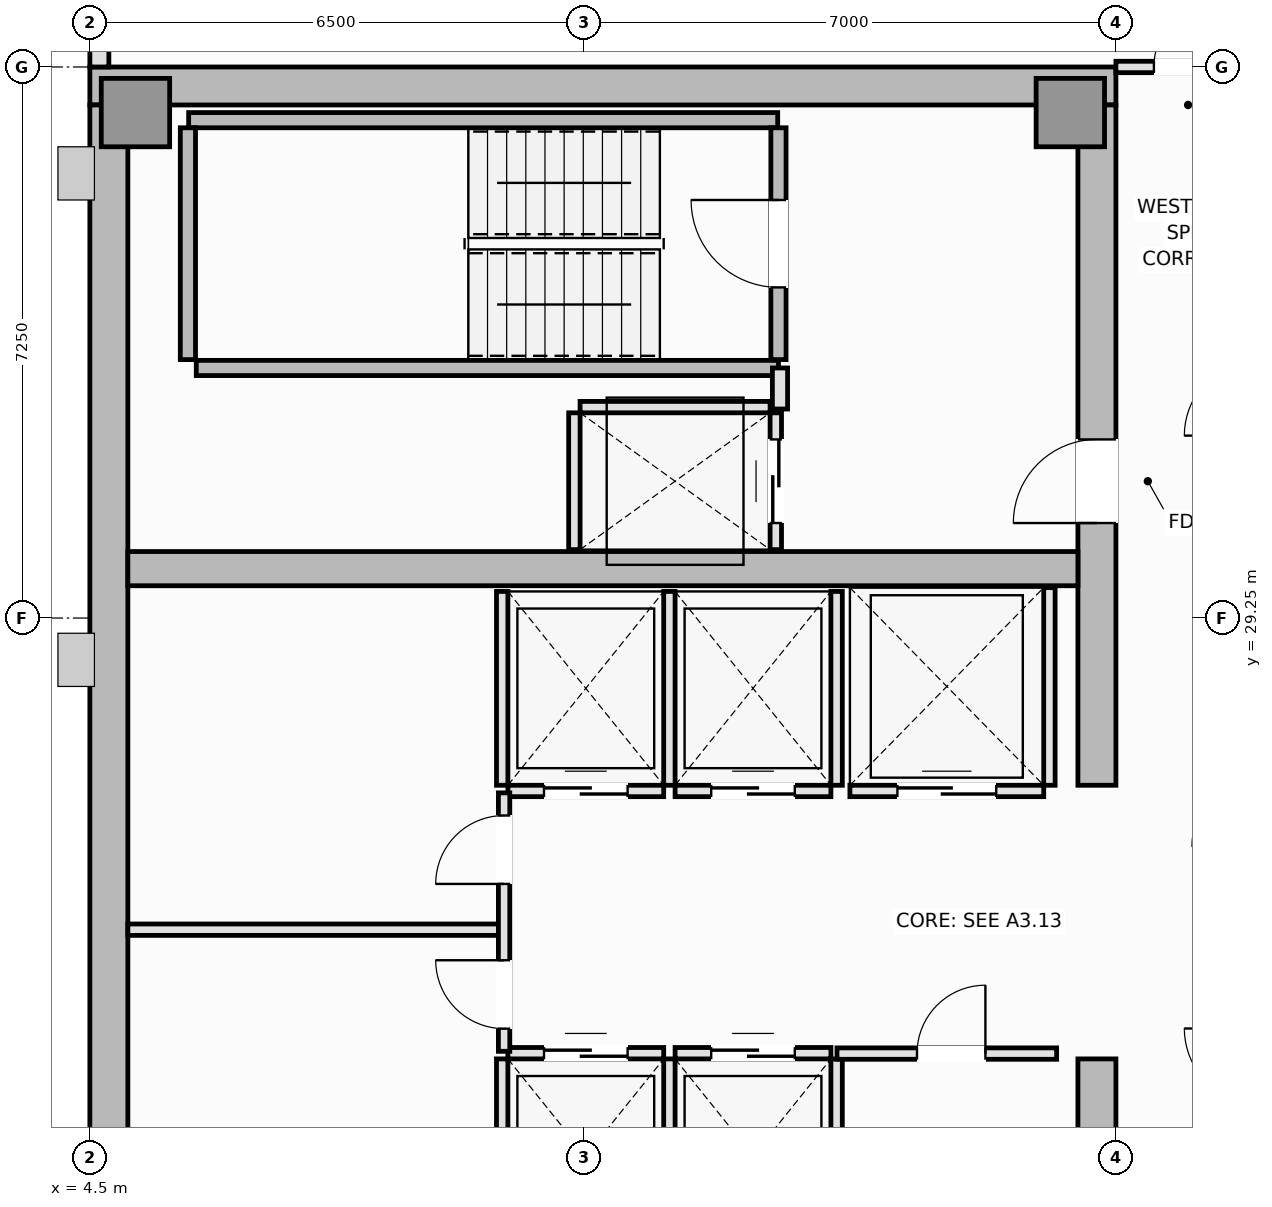
"""IFC4 building model, lengths in metres.
Left out: names, types, materials, properties, quantities, classifications, styles, units other than length and angle.
Written with IfcOpenShell. Run it as: python <this file> out.ifc"""

import sys

from ifc_helpers import new_model, si_unit, direction, frame, frame_2d, origin, origin_2d, place, context, subcontext, project, spatial, rectangle, extrude, element, fill, save


model = new_model("IFC4")
c1 = context("Model", 3, precision=1e-05, world=origin(), true_north=direction((0.0, 1.0)))
c2 = subcontext(c1, "Body", "Model", "MODEL_VIEW")
j1 = project(units=[si_unit("LENGTHUNIT", "METRE"), si_unit("PLANEANGLEUNIT", "RADIAN")], contexts=[c1])
p1 = place(None, origin())
s1 = spatial("IfcSite", under=j1, at=p1, CompositionType="ELEMENT")
p2 = place(p1, origin())
s2 = spatial("IfcBuilding", under=s1, at=p2, CompositionType="ELEMENT")
p3 = place(p2, frame((0.0, 0.0, 281.2)))
s3 = spatial("IfcBuildingStorey", under=s2, at=p3, CompositionType="ELEMENT", Elevation=281.2)
p4 = place(p3, frame((4.5, 36.25, 0.0), z_axis=(0.0, 0.0, 1.0), x_axis=(1.0, 0.0, 0.0)))
e1 = element("IfcWall", 1, at=p4, inside=s3, PredefinedType="SHEAR", context=c2, shape_type="SweptSolid", body=[
    extrude(rectangle(XDim=13.5, YDim=0.5, at=frame_2d((6.75, 0.0))), origin(), (0.0, 0.0, 1.0), 3.55),
])
p5 = place(p3, frame((4.75, 14.5, 0.0), z_axis=(0.0, 0.0, 1.0), x_axis=(0.0, 1.0, 0.0)))
e2 = element("IfcWall", 2, at=p5, inside=s3, PredefinedType="SHEAR", context=c2, shape_type="SweptSolid", body=[
    extrude(rectangle(XDim=21.5, YDim=0.5, at=frame_2d((10.75, 0.0))), origin(), (0.0, 0.0, 1.0), 3.55),
])
p6 = place(p3, frame((17.75, 14.5, 0.0), z_axis=(0.0, 0.0, 1.0), x_axis=(0.0, 1.0, 0.0)))
e3 = element("IfcWall", 3, at=p6, inside=s3, PredefinedType="SHEAR", context=c2, shape_type="SweptSolid", body=[
    extrude(rectangle(XDim=8.95, YDim=0.5, at=frame_2d((4.475, 0.0))), origin(), (0.0, 0.0, 1.0), 3.55),
])
p7 = place(p6, frame((4.4, 0.0, 0.0)))
e4 = element("IfcOpeningElement", 4, at=p7, cuts=e3, PredefinedType="OPENING", context=c2, shape_type="SweptSolid", body=[
    extrude(rectangle(XDim=1.1, YDim=2.15, at=frame_2d((0.55, 1.075))), frame((0.0, 0.26, 0.0), z_axis=(0.0, -1.0, 0.0), x_axis=(1.0, 0.0, 0.0)), (0.0, 0.0, 1.0), 0.52),
])
p8 = place(p3, frame((17.75, 27.05, 0.0), z_axis=(0.0, 0.0, 1.0), x_axis=(0.0, 1.0, 0.0)))
e5 = element("IfcWall", 5, at=p8, inside=s3, PredefinedType="SHEAR", context=c2, shape_type="SweptSolid", body=[
    extrude(rectangle(XDim=8.95, YDim=0.5, at=frame_2d((4.475, 0.0))), origin(), (0.0, 0.0, 1.0), 3.55),
])
p9 = place(p8, frame((3.45, 0.0, 0.0)))
e6 = element("IfcOpeningElement", 6, at=p9, cuts=e5, PredefinedType="OPENING", context=c2, shape_type="SweptSolid", body=[
    extrude(rectangle(XDim=1.1, YDim=2.15, at=frame_2d((0.55, 1.075))), frame((0.0, 0.26, 0.0), z_axis=(0.0, -1.0, 0.0), x_axis=(1.0, 0.0, 0.0)), (0.0, 0.0, 1.0), 0.52),
])
p10 = place(p3, frame((5.0, 29.9, 0.0), z_axis=(0.0, 0.0, 1.0), x_axis=(1.0, 0.0, 0.0)))
e7 = element("IfcWall", 7, at=p10, inside=s3, PredefinedType="SHEAR", context=c2, shape_type="SweptSolid", body=[
    extrude(rectangle(XDim=12.5, YDim=0.45, at=frame_2d((6.25, 0.0))), origin(), (0.0, 0.0, 1.0), 3.55),
])
for number, where, z_axis, x_axis in (
    (8, (5.1, 35.9, 0.0), (0.0, 0.0, 1.0), (1.0, 0.0, 0.0)),
    (9, (17.4, 35.9, 0.0), (0.0, 0.0, 1.0), (1.0, 0.0, 0.0)),
):
    element("IfcColumn", number, at=place(p3, frame(where, z_axis=z_axis, x_axis=x_axis)), inside=s3, PredefinedType="PILASTER", context=c2, shape_type="SweptSolid", body=[
        extrude(rectangle(XDim=0.9, YDim=0.9, at=origin_2d()), origin(), (0.0, 0.0, 1.0), 3.55),
    ])
p11 = place(p3, frame((4.625, 39.4, 0.0), z_axis=(0.0, 0.0, 1.0), x_axis=(0.0, -1.0, 0.0)))
e10 = element("IfcWall", 10, at=p11, inside=s3, PredefinedType="SOLIDWALL", context=c2, shape_type="SweptSolid", body=[
    extrude(rectangle(XDim=2.9, YDim=0.25, at=frame_2d((1.45, 0.0))), origin(), (0.0, 0.0, 1.0), 3.39),
])
p12 = place(p3, frame((5.8, 35.8, 0.0), z_axis=(0.0, 0.0, 1.0), x_axis=(1.0, 0.0, 0.0)))
e11 = element("IfcWall", 11, at=p12, inside=s3, PredefinedType="SOLIDWALL", context=c2, shape_type="SweptSolid", body=[
    extrude(rectangle(XDim=7.75, YDim=0.2, at=frame_2d((3.875, 0.0))), origin(), (0.0, 0.0, 1.0), 3.55),
])
p13 = place(p3, frame((5.79, 32.65, 0.0), z_axis=(0.0, 0.0, 1.0), x_axis=(0.0, 1.0, 0.0)))
e12 = element("IfcWall", 12, at=p13, inside=s3, PredefinedType="SOLIDWALL", context=c2, shape_type="SweptSolid", body=[
    extrude(rectangle(XDim=3.05, YDim=0.2, at=frame_2d((1.525, 0.0))), origin(), (0.0, 0.0, 1.0), 3.55),
])
p14 = place(p3, frame((5.9, 32.54, 0.0), z_axis=(0.0, 0.0, 1.0), x_axis=(1.0, 0.0, 0.0)))
e13 = element("IfcWall", 13, at=p14, inside=s3, PredefinedType="SOLIDWALL", context=c2, shape_type="SweptSolid", body=[
    extrude(rectangle(XDim=7.66, YDim=0.2, at=frame_2d((3.83, 0.0))), origin(), (0.0, 0.0, 1.0), 3.55),
])
p15 = place(p3, frame((13.56, 32.65, 0.0), z_axis=(0.0, 0.0, 1.0), x_axis=(0.0, 1.0, 0.0)))
e14 = element("IfcWall", 14, at=p15, inside=s3, PredefinedType="SOLIDWALL", context=c2, shape_type="SweptSolid", body=[
    extrude(rectangle(XDim=3.05, YDim=0.2, at=frame_2d((1.525, 0.0))), origin(), (0.0, 0.0, 1.0), 3.55),
])
p16 = place(p15, frame((0.95, 0.0, 0.0)))
e15 = element("IfcOpeningElement", 15, at=p16, cuts=e14, PredefinedType="OPENING", context=c2, shape_type="SweptSolid", body=[
    extrude(rectangle(XDim=1.15, YDim=2.15, at=frame_2d((0.575, 1.075))), frame((0.0, 0.11, 0.0), z_axis=(0.0, -1.0, 0.0), x_axis=(1.0, 0.0, 0.0)), (0.0, 0.0, 1.0), 0.22),
])
p17 = place(p3, frame((10.0, 23.525, 0.0), z_axis=(0.0, 0.0, 1.0), x_axis=(1.0, 0.0, 0.0)))
e16 = element("IfcWall", 16, at=p17, inside=s3, PredefinedType="PARTITIONING", context=c2, shape_type="SweptSolid", body=[
    extrude(rectangle(XDim=2.05, YDim=0.15, at=frame_2d((1.025, 0.0))), origin(), (0.0, 0.0, 1.0), 3.39),
])
p18 = place(p17, frame((0.475, 0.0, 0.0)))
e17 = element("IfcOpeningElement", 17, at=p18, cuts=e16, PredefinedType="OPENING", context=c2, shape_type="SweptSolid", body=[
    extrude(rectangle(XDim=1.1, YDim=2.2, at=frame_2d((0.55, 1.1))), frame((0.0, 0.085, 0.0), z_axis=(0.0, -1.0, 0.0), x_axis=(1.0, 0.0, 0.0)), (0.0, 0.0, 1.0), 0.17),
])
for number, where, z_axis, x_axis in (
    (18, (9.925, 20.9, 0.0), (0.0, 0.0, 1.0), (0.0, 1.0, 0.0)),
    (19, (12.125, 20.9, 0.0), (0.0, 0.0, 1.0), (0.0, 1.0, 0.0)),
):
    element("IfcWall", number, at=place(p3, frame(where, z_axis=z_axis, x_axis=x_axis)), inside=s3, PredefinedType="PARTITIONING", context=c2, shape_type="SweptSolid", body=[
        extrude(rectangle(XDim=2.55, YDim=0.15, at=frame_2d((1.275, 0.0))), origin(), (0.0, 0.0, 1.0), 3.39),
    ])
p19 = place(p3, frame((12.2, 23.525, 0.0), z_axis=(0.0, 0.0, 1.0), x_axis=(1.0, 0.0, 0.0)))
e20 = element("IfcWall", 20, at=p19, inside=s3, PredefinedType="PARTITIONING", context=c2, shape_type="SweptSolid", body=[
    extrude(rectangle(XDim=2.05, YDim=0.15, at=frame_2d((1.025, 0.0))), origin(), (0.0, 0.0, 1.0), 3.39),
])
p20 = place(p19, frame((0.475, 0.0, 0.0)))
e21 = element("IfcOpeningElement", 21, at=p20, cuts=e20, PredefinedType="OPENING", context=c2, shape_type="SweptSolid", body=[
    extrude(rectangle(XDim=1.1, YDim=2.2, at=frame_2d((0.55, 1.1))), frame((0.0, 0.085, 0.0), z_axis=(0.0, -1.0, 0.0), x_axis=(1.0, 0.0, 0.0)), (0.0, 0.0, 1.0), 0.17),
])
p21 = place(p3, frame((14.325, 20.9, 0.0), z_axis=(0.0, 0.0, 1.0), x_axis=(0.0, 1.0, 0.0)))
e22 = element("IfcWall", 22, at=p21, inside=s3, PredefinedType="PARTITIONING", context=c2, shape_type="SweptSolid", body=[
    extrude(rectangle(XDim=2.55, YDim=0.15, at=frame_2d((1.275, 0.0))), origin(), (0.0, 0.0, 1.0), 3.39),
])
p22 = place(p3, frame((10.0, 26.975, 0.0), z_axis=(0.0, 0.0, 1.0), x_axis=(1.0, 0.0, 0.0)))
e23 = element("IfcWall", 23, at=p22, inside=s3, PredefinedType="PARTITIONING", context=c2, shape_type="SweptSolid", body=[
    extrude(rectangle(XDim=2.05, YDim=0.15, at=frame_2d((1.025, 0.0))), origin(), (0.0, 0.0, 1.0), 3.39),
])
p23 = place(p22, frame((0.475, 0.0, 0.0)))
e24 = element("IfcOpeningElement", 24, at=p23, cuts=e23, PredefinedType="OPENING", context=c2, shape_type="SweptSolid", body=[
    extrude(rectangle(XDim=1.1, YDim=2.2, at=frame_2d((0.55, 1.1))), frame((0.0, 0.085, 0.0), z_axis=(0.0, -1.0, 0.0), x_axis=(1.0, 0.0, 0.0)), (0.0, 0.0, 1.0), 0.17),
])
for number, where, z_axis, x_axis in (
    (25, (9.925, 27.05, 0.0), (0.0, 0.0, 1.0), (0.0, 1.0, 0.0)),
    (26, (12.125, 27.05, 0.0), (0.0, 0.0, 1.0), (0.0, 1.0, 0.0)),
):
    element("IfcWall", number, at=place(p3, frame(where, z_axis=z_axis, x_axis=x_axis)), inside=s3, PredefinedType="PARTITIONING", context=c2, shape_type="SweptSolid", body=[
        extrude(rectangle(XDim=2.55, YDim=0.15, at=frame_2d((1.275, 0.0))), origin(), (0.0, 0.0, 1.0), 3.39),
    ])
p24 = place(p3, frame((12.2, 26.975, 0.0), z_axis=(0.0, 0.0, 1.0), x_axis=(1.0, 0.0, 0.0)))
e27 = element("IfcWall", 27, at=p24, inside=s3, PredefinedType="PARTITIONING", context=c2, shape_type="SweptSolid", body=[
    extrude(rectangle(XDim=2.05, YDim=0.15, at=frame_2d((1.025, 0.0))), origin(), (0.0, 0.0, 1.0), 3.39),
])
p25 = place(p24, frame((0.475, 0.0, 0.0)))
e28 = element("IfcOpeningElement", 28, at=p25, cuts=e27, PredefinedType="OPENING", context=c2, shape_type="SweptSolid", body=[
    extrude(rectangle(XDim=1.1, YDim=2.2, at=frame_2d((0.55, 1.1))), frame((0.0, 0.085, 0.0), z_axis=(0.0, -1.0, 0.0), x_axis=(1.0, 0.0, 0.0)), (0.0, 0.0, 1.0), 0.17),
])
p26 = place(p3, frame((14.325, 27.05, 0.0), z_axis=(0.0, 0.0, 1.0), x_axis=(0.0, 1.0, 0.0)))
e29 = element("IfcWall", 29, at=p26, inside=s3, PredefinedType="PARTITIONING", context=c2, shape_type="SweptSolid", body=[
    extrude(rectangle(XDim=2.55, YDim=0.15, at=frame_2d((1.275, 0.0))), origin(), (0.0, 0.0, 1.0), 3.39),
])
p27 = place(p3, frame((14.5, 26.975, 0.0), z_axis=(0.0, 0.0, 1.0), x_axis=(1.0, 0.0, 0.0)))
e30 = element("IfcWall", 30, at=p27, inside=s3, PredefinedType="PARTITIONING", context=c2, shape_type="SweptSolid", body=[
    extrude(rectangle(XDim=2.55, YDim=0.15, at=frame_2d((1.275, 0.0))), origin(), (0.0, 0.0, 1.0), 3.39),
])
p28 = place(p27, frame((0.625, 0.0, 0.0)))
e31 = element("IfcOpeningElement", 31, at=p28, cuts=e30, PredefinedType="OPENING", context=c2, shape_type="SweptSolid", body=[
    extrude(rectangle(XDim=1.3, YDim=2.2, at=frame_2d((0.65, 1.1))), frame((0.0, 0.085, 0.0), z_axis=(0.0, -1.0, 0.0), x_axis=(1.0, 0.0, 0.0)), (0.0, 0.0, 1.0), 0.17),
])
p29 = place(p3, frame((17.125, 27.05, 0.0), z_axis=(0.0, 0.0, 1.0), x_axis=(0.0, 1.0, 0.0)))
e32 = element("IfcWall", 32, at=p29, inside=s3, PredefinedType="PARTITIONING", context=c2, shape_type="SweptSolid", body=[
    extrude(rectangle(XDim=2.6, YDim=0.15, at=frame_2d((1.3, 0.0))), origin(), (0.0, 0.0, 1.0), 3.39),
])
p30 = place(p3, frame((10.95, 32.025, 0.0), z_axis=(0.0, 0.0, 1.0), x_axis=(1.0, 0.0, 0.0)))
e33 = element("IfcWall", 33, at=p30, inside=s3, PredefinedType="PARTITIONING", context=c2, shape_type="SweptSolid", body=[
    extrude(rectangle(XDim=2.5, YDim=0.15, at=frame_2d((1.25, 0.0))), origin(), (0.0, 0.0, 1.0), 3.39),
])
p31 = place(p3, frame((10.875, 30.15, 0.0), z_axis=(0.0, 0.0, 1.0), x_axis=(0.0, 1.0, 0.0)))
e34 = element("IfcWall", 34, at=p31, inside=s3, PredefinedType="PARTITIONING", context=c2, shape_type="SweptSolid", body=[
    extrude(rectangle(XDim=1.8, YDim=0.15, at=frame_2d((0.9, 0.0))), origin(), (0.0, 0.0, 1.0), 3.39),
])
p32 = place(p3, frame((13.525, 30.15, 0.0), z_axis=(0.0, 0.0, 1.0), x_axis=(0.0, 1.0, 0.0)))
e35 = element("IfcWall", 35, at=p32, inside=s3, PredefinedType="PARTITIONING", context=c2, shape_type="SweptSolid", body=[
    extrude(rectangle(XDim=1.8, YDim=0.15, at=frame_2d((0.9, 0.0))), origin(), (0.0, 0.0, 1.0), 3.39),
])
p33 = place(p32, frame((0.35, 0.0, 0.0)))
e36 = element("IfcOpeningElement", 36, at=p33, cuts=e35, PredefinedType="OPENING", context=c2, shape_type="SweptSolid", body=[
    extrude(rectangle(XDim=1.1, YDim=2.2, at=frame_2d((0.55, 1.1))), frame((0.0, 0.085, 0.0), z_axis=(0.0, -1.0, 0.0), x_axis=(1.0, 0.0, 0.0)), (0.0, 0.0, 1.0), 0.17),
])
p34 = place(p3, frame((13.58, 32.0, 0.0), z_axis=(0.0, 0.0, 1.0), x_axis=(0.0, 1.0, 0.0)))
e37 = element("IfcWall", 37, at=p34, inside=s3, PredefinedType="PARTITIONING", context=c2, shape_type="SweptSolid", body=[
    extrude(rectangle(XDim=0.54, YDim=0.2, at=frame_2d((0.27, 0.0))), origin(), (0.0, 0.0, 1.0), 3.39),
])
p35 = place(p3, frame((5.0, 25.15, 0.0), z_axis=(0.0, 0.0, 1.0), x_axis=(1.0, 0.0, 0.0)))
e38 = element("IfcWall", 38, at=p35, inside=s3, PredefinedType="PARTITIONING", context=c2, shape_type="SweptSolid", body=[
    extrude(rectangle(XDim=4.95, YDim=0.15, at=frame_2d((2.475, 0.0))), origin(), (0.0, 0.0, 1.0), 3.39),
])
p36 = place(p3, frame((9.95, 23.55, 0.0), z_axis=(0.0, 0.0, 1.0), x_axis=(0.0, 1.0, 0.0)))
e39 = element("IfcWall", 39, at=p36, inside=s3, PredefinedType="PARTITIONING", context=c2, shape_type="SweptSolid", body=[
    extrude(rectangle(XDim=3.4, YDim=0.15, at=frame_2d((1.7, 0.0))), origin(), (0.0, 0.0, 1.0), 3.39),
])
p37 = place(p36, frame((0.298, 0.0, 0.0)))
e40 = element("IfcOpeningElement", 40, at=p37, cuts=e39, PredefinedType="OPENING", context=c2, shape_type="SweptSolid", body=[
    extrude(rectangle(XDim=0.9, YDim=2.1, at=frame_2d((0.45, 1.05))), frame((0.0, 0.085, 0.0), z_axis=(0.0, -1.0, 0.0), x_axis=(1.0, 0.0, 0.0)), (0.0, 0.0, 1.0), 0.17),
])
p38 = place(p36, frame((2.202, 0.0, 0.0)))
e41 = element("IfcOpeningElement", 41, at=p38, cuts=e39, PredefinedType="OPENING", context=c2, shape_type="SweptSolid", body=[
    extrude(rectangle(XDim=0.9, YDim=2.1, at=frame_2d((0.45, 1.05))), frame((0.0, 0.085, 0.0), z_axis=(0.0, -1.0, 0.0), x_axis=(1.0, 0.0, 0.0)), (0.0, 0.0, 1.0), 0.17),
])
p39 = place(p3, frame((14.33, 23.52, 0.0), z_axis=(0.0, 0.0, 1.0), x_axis=(1.0, 0.0, 0.0)))
e42 = element("IfcWall", 42, at=p39, inside=s3, PredefinedType="PARTITIONING", context=c2, shape_type="SweptSolid", body=[
    extrude(rectangle(XDim=2.89, YDim=0.15, at=frame_2d((1.445, 0.0))), origin(), (0.0, 0.0, 1.0), 3.39),
])
p40 = place(p39, frame((1.053, 0.0, 0.0)))
e43 = element("IfcOpeningElement", 43, at=p40, cuts=e42, PredefinedType="OPENING", context=c2, shape_type="SweptSolid", body=[
    extrude(rectangle(XDim=0.9, YDim=2.1, at=frame_2d((0.45, 1.05))), frame((0.0, 0.085, 0.0), z_axis=(0.0, -1.0, 0.0), x_axis=(1.0, 0.0, 0.0)), (0.0, 0.0, 1.0), 0.17),
])
p41 = place(p3, frame((18.0, 36.5, 0.0), z_axis=(0.0, 0.0, 1.0), x_axis=(1.0, 0.0, 0.0)))
e44 = element("IfcWall", 44, at=p41, inside=s3, PredefinedType="PARTITIONING", context=c2, shape_type="SweptSolid", body=[
    extrude(rectangle(XDim=1.9, YDim=0.15, at=frame_2d((0.95, 0.0))), origin(), (0.0, 0.0, 1.0), 3.39),
])
p42 = place(p41, frame((0.5, 0.0, 0.0)))
e45 = element("IfcOpeningElement", 45, at=p42, cuts=e44, PredefinedType="OPENING", context=c2, shape_type="SweptSolid", body=[
    extrude(rectangle(XDim=0.9, YDim=2.1, at=frame_2d((0.45, 1.05))), frame((0.0, 0.085, 0.0), z_axis=(0.0, -1.0, 0.0), x_axis=(1.0, 0.0, 0.0)), (0.0, 0.0, 1.0), 0.17),
])
p43 = place(p16, origin())
e46 = element("IfcDoor", 46, at=p43, inside=s3, OperationType="SINGLE_SWING_RIGHT", PredefinedType="DOOR", context=c2, shape_type="SweptSolid", body=[
    extrude(rectangle(XDim=1.15, YDim=2.15, at=frame_2d((0.575, 1.075))), frame((0.0, 0.025, 0.0), z_axis=(0.0, -1.0, 0.0), x_axis=(1.0, 0.0, 0.0)), (0.0, 0.0, 1.0), 0.05),
])
fill(e15, e46)
p44 = place(p18, origin())
e47 = element("IfcDoor", 47, at=p44, inside=s3, OperationType="DOUBLE_DOOR_SLIDING", PredefinedType="DOOR", context=c2, shape_type="SweptSolid", body=[
    extrude(rectangle(XDim=1.1, YDim=2.2, at=frame_2d((0.55, 1.1))), frame((0.0, 0.025, 0.0), z_axis=(0.0, -1.0, 0.0), x_axis=(1.0, 0.0, 0.0)), (0.0, 0.0, 1.0), 0.05),
])
fill(e17, e47)
p45 = place(p20, origin())
e48 = element("IfcDoor", 48, at=p45, inside=s3, OperationType="DOUBLE_DOOR_SLIDING", PredefinedType="DOOR", context=c2, shape_type="SweptSolid", body=[
    extrude(rectangle(XDim=1.1, YDim=2.2, at=frame_2d((0.55, 1.1))), frame((0.0, 0.025, 0.0), z_axis=(0.0, -1.0, 0.0), x_axis=(1.0, 0.0, 0.0)), (0.0, 0.0, 1.0), 0.05),
])
fill(e21, e48)
p46 = place(p23, origin())
e49 = element("IfcDoor", 49, at=p46, inside=s3, OperationType="DOUBLE_DOOR_SLIDING", PredefinedType="DOOR", context=c2, shape_type="SweptSolid", body=[
    extrude(rectangle(XDim=1.1, YDim=2.2, at=frame_2d((0.55, 1.1))), frame((0.0, 0.025, 0.0), z_axis=(0.0, -1.0, 0.0), x_axis=(1.0, 0.0, 0.0)), (0.0, 0.0, 1.0), 0.05),
])
fill(e24, e49)
p47 = place(p25, origin())
e50 = element("IfcDoor", 50, at=p47, inside=s3, OperationType="DOUBLE_DOOR_SLIDING", PredefinedType="DOOR", context=c2, shape_type="SweptSolid", body=[
    extrude(rectangle(XDim=1.1, YDim=2.2, at=frame_2d((0.55, 1.1))), frame((0.0, 0.025, 0.0), z_axis=(0.0, -1.0, 0.0), x_axis=(1.0, 0.0, 0.0)), (0.0, 0.0, 1.0), 0.05),
])
fill(e28, e50)
p48 = place(p28, origin())
e51 = element("IfcDoor", 51, at=p48, inside=s3, OperationType="DOUBLE_DOOR_SLIDING", PredefinedType="DOOR", context=c2, shape_type="SweptSolid", body=[
    extrude(rectangle(XDim=1.3, YDim=2.2, at=frame_2d((0.65, 1.1))), frame((0.0, 0.025, 0.0), z_axis=(0.0, -1.0, 0.0), x_axis=(1.0, 0.0, 0.0)), (0.0, 0.0, 1.0), 0.05),
])
fill(e31, e51)
p49 = place(p33, origin())
e52 = element("IfcDoor", 52, at=p49, inside=s3, OperationType="DOUBLE_DOOR_SLIDING", PredefinedType="DOOR", context=c2, shape_type="SweptSolid", body=[
    extrude(rectangle(XDim=1.1, YDim=2.2, at=frame_2d((0.55, 1.1))), frame((0.0, 0.025, 0.0), z_axis=(0.0, -1.0, 0.0), x_axis=(1.0, 0.0, 0.0)), (0.0, 0.0, 1.0), 0.05),
])
fill(e36, e52)
p50 = place(p9, origin())
e53 = element("IfcDoor", 53, at=p50, inside=s3, OperationType="SINGLE_SWING_LEFT", PredefinedType="DOOR", context=c2, shape_type="SweptSolid", body=[
    extrude(rectangle(XDim=1.1, YDim=2.15, at=frame_2d((0.55, 1.075))), frame((0.0, 0.025, 0.0), z_axis=(0.0, -1.0, 0.0), x_axis=(1.0, 0.0, 0.0)), (0.0, 0.0, 1.0), 0.05),
])
fill(e6, e53)
p51 = place(p37, origin())
e54 = element("IfcDoor", 54, at=p51, inside=s3, OperationType="SINGLE_SWING_RIGHT", PredefinedType="DOOR", context=c2, shape_type="SweptSolid", body=[
    extrude(rectangle(XDim=0.9, YDim=2.1, at=frame_2d((0.45, 1.05))), frame((0.0, 0.025, 0.0), z_axis=(0.0, -1.0, 0.0), x_axis=(1.0, 0.0, 0.0)), (0.0, 0.0, 1.0), 0.05),
])
fill(e40, e54)
p52 = place(p38, origin())
e55 = element("IfcDoor", 55, at=p52, inside=s3, OperationType="SINGLE_SWING_LEFT", PredefinedType="DOOR", context=c2, shape_type="SweptSolid", body=[
    extrude(rectangle(XDim=0.9, YDim=2.1, at=frame_2d((0.45, 1.05))), frame((0.0, 0.025, 0.0), z_axis=(0.0, -1.0, 0.0), x_axis=(1.0, 0.0, 0.0)), (0.0, 0.0, 1.0), 0.05),
])
fill(e41, e55)
p53 = place(p40, origin())
e56 = element("IfcDoor", 56, at=p53, inside=s3, OperationType="SINGLE_SWING_RIGHT", PredefinedType="DOOR", context=c2, shape_type="SweptSolid", body=[
    extrude(rectangle(XDim=0.9, YDim=2.1, at=frame_2d((0.45, 1.05))), frame((0.0, 0.025, 0.0), z_axis=(0.0, -1.0, 0.0), x_axis=(1.0, 0.0, 0.0)), (0.0, 0.0, 1.0), 0.05),
])
fill(e43, e56)
p54 = place(p42, origin())
e57 = element("IfcDoor", 57, at=p54, inside=s3, OperationType="SINGLE_SWING_RIGHT", PredefinedType="DOOR", context=c2, shape_type="SweptSolid", body=[
    extrude(rectangle(XDim=0.9, YDim=2.1, at=frame_2d((0.45, 1.05))), frame((0.0, 0.025, 0.0), z_axis=(0.0, -1.0, 0.0), x_axis=(1.0, 0.0, 0.0)), (0.0, 0.0, 1.0), 0.05),
])
fill(e45, e57)
save(model, sys.argv[1])
